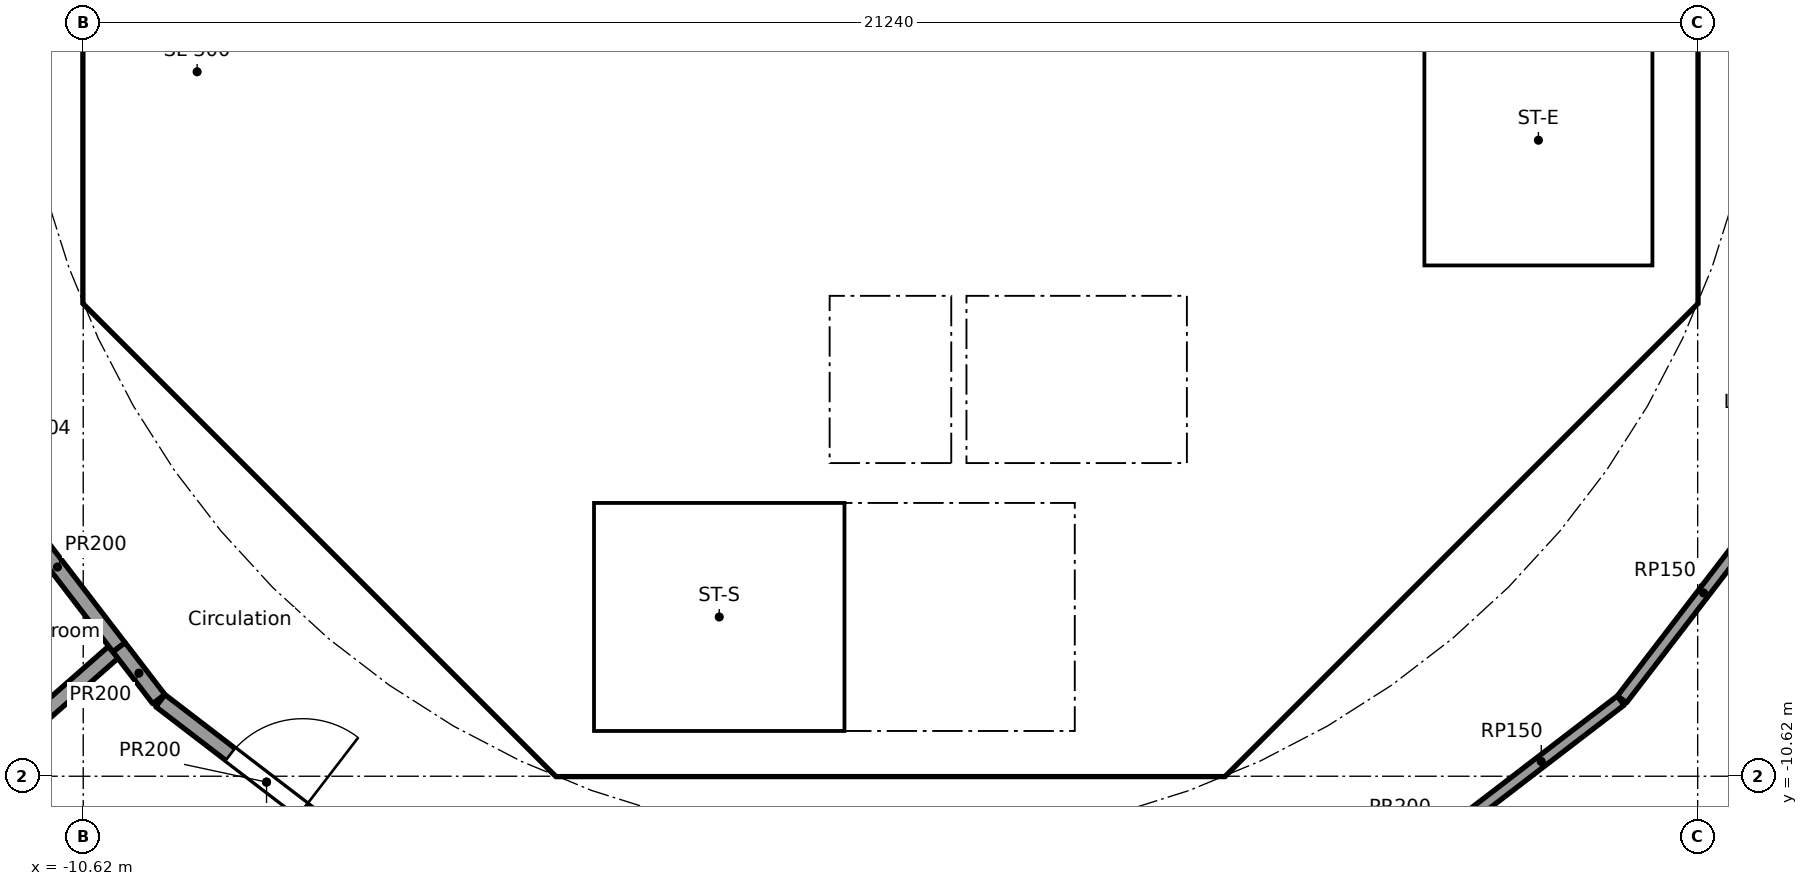
"""IFC4 building model, lengths in metres.
Left out: names, types, materials, properties, quantities, classifications, styles, units other than length and angle.
Written with IfcOpenShell. Run it as: python <this file> out.ifc"""

import sys

from ifc_helpers import new_model, si_unit, direction, frame, frame_2d, origin, place, context, subcontext, project, spatial, polyline, rectangle, outline, extrude, element, fill, save


model = new_model("IFC4")
c1 = context("Model", 3, precision=1e-05, world=origin(), true_north=direction((0.0, 1.0)))
c2 = subcontext(c1, "Body", "Model", "MODEL_VIEW")
j1 = project(units=[si_unit("LENGTHUNIT", "METRE"), si_unit("PLANEANGLEUNIT", "RADIAN")], contexts=[c1])
p1 = place(None, origin())
s1 = spatial("IfcSite", under=j1, at=p1, CompositionType="ELEMENT")
p2 = place(p1, origin())
s2 = spatial("IfcBuilding", under=s1, at=p2, CompositionType="ELEMENT")
p3 = place(p2, frame((0.0, 0.0, 336.9)))
s3 = spatial("IfcBuildingStorey", under=s2, at=p3, CompositionType="ELEMENT", Elevation=336.9)
p4 = place(p3, frame((-10.325, 3.801, 0.0), z_axis=(0.0, 0.0, 1.0), x_axis=(0.0, -1.0, 0.0)))
e1 = element("IfcWall", 1, at=p4, inside=s3, PredefinedType="SHEAR", context=c2, shape_type="SweptSolid", body=[
    extrude(rectangle(XDim=7.602, YDim=0.6, at=frame_2d((3.801, 0.0))), origin(), (0.0, 0.0, 1.0), 3.7),
])
p5 = place(p4, frame((0.651, 0.0, 0.0)))
e2 = element("IfcOpeningElement", 2, at=p5, cuts=e1, PredefinedType="OPENING", context=c2, shape_type="SweptSolid", body=[
    extrude(rectangle(XDim=1.5, YDim=2.1, at=frame_2d((0.75, 1.05))), frame((0.0, 0.31, 0.0), z_axis=(0.0, -1.0, 0.0), x_axis=(1.0, 0.0, 0.0)), (0.0, 0.0, 1.0), 0.62),
])
p6 = place(p4, frame((5.451, 0.0, 0.0)))
e3 = element("IfcOpeningElement", 3, at=p6, cuts=e1, PredefinedType="OPENING", context=c2, shape_type="SweptSolid", body=[
    extrude(rectangle(XDim=1.5, YDim=2.1, at=frame_2d((0.75, 1.05))), frame((0.0, 0.31, 0.0), z_axis=(0.0, -1.0, 0.0), x_axis=(1.0, 0.0, 0.0)), (0.0, 0.0, 1.0), 0.62),
])
p7 = place(p3, frame((-9.988, -4.613, 0.0), z_axis=(0.0, 0.0, 1.0), x_axis=(0.707106781187, -0.707106781187, 0.0)))
e4 = element("IfcWall", 4, at=p7, inside=s3, PredefinedType="SHEAR", context=c2, shape_type="SweptSolid", body=[
    extrude(rectangle(XDim=7.602, YDim=0.6, at=frame_2d((3.801, 0.0))), origin(), (0.0, 0.0, 1.0), 3.7),
])
p8 = place(p7, frame((6.151, 0.0, 0.0)))
e5 = element("IfcOpeningElement", 5, at=p8, cuts=e4, PredefinedType="OPENING", context=c2, shape_type="SweptSolid", body=[
    extrude(rectangle(XDim=1.1, YDim=2.1, at=frame_2d((0.55, 1.05))), frame((0.0, 0.31, 0.0), z_axis=(0.0, -1.0, 0.0), x_axis=(1.0, 0.0, 0.0)), (0.0, 0.0, 1.0), 0.62),
])
p9 = place(p3, frame((4.613, -9.988, 0.0), z_axis=(0.0, 0.0, 1.0), x_axis=(0.707106781187, 0.707106781187, 0.0)))
e6 = element("IfcWall", 6, at=p9, inside=s3, PredefinedType="SHEAR", context=c2, shape_type="SweptSolid", body=[
    extrude(rectangle(XDim=7.602, YDim=0.6, at=frame_2d((3.801, 0.0))), origin(), (0.0, 0.0, 1.0), 3.7),
])
p10 = place(p9, frame((3.201, 0.0, 0.0)))
e7 = element("IfcOpeningElement", 7, at=p10, cuts=e6, PredefinedType="OPENING", context=c2, shape_type="SweptSolid", body=[
    extrude(rectangle(XDim=1.2, YDim=2.1, at=frame_2d((0.6, 1.05))), frame((0.0, 0.31, 0.0), z_axis=(0.0, -1.0, 0.0), x_axis=(1.0, 0.0, 0.0)), (0.0, 0.0, 1.0), 0.62),
])
p11 = place(p3, frame((4.0, -10.025, 0.0), z_axis=(0.0, 0.0, 1.0), x_axis=(0.0, 1.0, 0.0)))
e8 = element("IfcWall", 8, at=p11, inside=s3, PredefinedType="SOLIDWALL", context=c2, shape_type="SweptSolid", body=[
    extrude(rectangle(XDim=3.0, YDim=0.2, at=frame_2d((1.5, 0.0))), origin(), (0.0, 0.0, 1.0), 3.7),
])
p12 = place(p11, frame((0.975, 0.0, 0.0)))
e9 = element("IfcOpeningElement", 9, at=p12, cuts=e8, PredefinedType="OPENING", context=c2, shape_type="SweptSolid", body=[
    extrude(rectangle(XDim=1.1, YDim=2.1, at=frame_2d((0.55, 1.05))), frame((0.0, 0.11, 0.0), z_axis=(0.0, -1.0, 0.0), x_axis=(1.0, 0.0, 0.0)), (0.0, 0.0, 1.0), 0.22),
])
p13 = place(p3, frame((-7.0, -7.027, 0.0), z_axis=(0.0, 0.0, 1.0), x_axis=(0.0, 1.0, 0.0)))
e10 = element("IfcWall", 10, at=p13, inside=s3, PredefinedType="PARTITIONING", context=c2, shape_type="SweptSolid", body=[
    extrude(rectangle(XDim=2.927, YDim=0.15, at=frame_2d((1.463, 0.0))), origin(), (0.0, 0.0, 1.0), 3.7),
])
p14 = place(p13, frame((0.976, 0.0, 0.0)))
e11 = element("IfcOpeningElement", 11, at=p14, cuts=e10, PredefinedType="OPENING", context=c2, shape_type="SweptSolid", body=[
    extrude(rectangle(XDim=0.9, YDim=2.1, at=frame_2d((0.45, 1.05))), frame((0.0, 0.085, 0.0), z_axis=(0.0, -1.0, 0.0), x_axis=(1.0, 0.0, 0.0)), (0.0, 0.0, 1.0), 0.17),
])
p15 = place(p3, frame((4.0, -6.5, 0.0), z_axis=(0.0, 0.0, 1.0), x_axis=(0.0, 1.0, 0.0)))
e12 = element("IfcWall", 12, at=p15, inside=s3, PredefinedType="SOLIDWALL", context=c2, shape_type="SweptSolid", body=[
    extrude(rectangle(XDim=2.2, YDim=0.2, at=frame_2d((1.1, 0.0))), origin(), (0.0, 0.0, 1.0), 3.7),
])
p16 = place(p15, frame((0.55, 0.0, 0.0)))
e13 = element("IfcOpeningElement", 13, at=p16, cuts=e12, PredefinedType="OPENING", context=c2, shape_type="SweptSolid", body=[
    extrude(rectangle(XDim=1.1, YDim=2.1, at=frame_2d((0.55, 1.05))), frame((0.0, 0.11, 0.0), z_axis=(0.0, -1.0, 0.0), x_axis=(1.0, 0.0, 0.0)), (0.0, 0.0, 1.0), 0.22),
])
p17 = place(p3, frame((-4.0, -6.5, 0.0), z_axis=(0.0, 0.0, 1.0), x_axis=(0.0, 1.0, 0.0)))
e14 = element("IfcWall", 14, at=p17, inside=s3, PredefinedType="SOLIDWALL", context=c2, shape_type="SweptSolid", body=[
    extrude(rectangle(XDim=2.2, YDim=0.2, at=frame_2d((1.1, 0.0))), origin(), (0.0, 0.0, 1.0), 3.7),
])
p18 = place(p17, frame((0.65, 0.0, 0.0)))
e15 = element("IfcOpeningElement", 15, at=p18, cuts=e14, PredefinedType="OPENING", context=c2, shape_type="SweptSolid", body=[
    extrude(rectangle(XDim=0.9, YDim=2.1, at=frame_2d((0.45, 1.05))), frame((0.0, 0.11, 0.0), z_axis=(0.0, -1.0, 0.0), x_axis=(1.0, 0.0, 0.0)), (0.0, 0.0, 1.0), 0.22),
])
p19 = place(p3, frame((-6.7, -2.0, 0.0), z_axis=(0.0, 0.0, 1.0), x_axis=(1.0, 0.0, 0.0)))
e16 = element("IfcWall", 16, at=p19, inside=s3, PredefinedType="SOLIDWALL", context=c2, shape_type="SweptSolid", body=[
    extrude(rectangle(XDim=13.4, YDim=0.2, at=frame_2d((6.7, 0.0))), origin(), (0.0, 0.0, 1.0), 3.7),
])
p20 = place(p19, frame((1.85, 0.0, 0.0)))
e17 = element("IfcOpeningElement", 17, at=p20, cuts=e16, PredefinedType="OPENING", context=c2, shape_type="SweptSolid", body=[
    extrude(rectangle(XDim=0.9, YDim=2.1, at=frame_2d((0.45, 1.05))), frame((0.0, 0.11, 0.0), z_axis=(0.0, -1.0, 0.0), x_axis=(1.0, 0.0, 0.0)), (0.0, 0.0, 1.0), 0.22),
])
p21 = place(p19, frame((6.25, 0.0, 0.0)))
e18 = element("IfcOpeningElement", 18, at=p21, cuts=e16, PredefinedType="OPENING", context=c2, shape_type="SweptSolid", body=[
    extrude(rectangle(XDim=0.9, YDim=2.1, at=frame_2d((0.45, 1.05))), frame((0.0, 0.11, 0.0), z_axis=(0.0, -1.0, 0.0), x_axis=(1.0, 0.0, 0.0)), (0.0, 0.0, 1.0), 0.22),
])
p22 = place(p19, frame((10.65, 0.0, 0.0)))
e19 = element("IfcOpeningElement", 19, at=p22, cuts=e16, PredefinedType="OPENING", context=c2, shape_type="SweptSolid", body=[
    extrude(rectangle(XDim=0.9, YDim=2.1, at=frame_2d((0.45, 1.05))), frame((0.0, 0.11, 0.0), z_axis=(0.0, -1.0, 0.0), x_axis=(1.0, 0.0, 0.0)), (0.0, 0.0, 1.0), 0.22),
])
p23 = place(p3, origin())
e20 = element("IfcWall", 20, at=p23, inside=s3, PredefinedType="SHEAR", context=c2, shape_type="SweptSolid", body=[
    extrude(outline(polyline([(-10.625, -3.801), (-10.025, -3.801), (-10.025, -4.152), (-9.776, -4.401), (-10.2, -4.825), (-10.625, -4.401), (-10.625, -3.801)])), origin(), (0.0, 0.0, 1.0), 3.7),
])
p24 = place(p3, origin())
e21 = element("IfcWall", 21, at=p24, inside=s3, PredefinedType="SHEAR", context=c2, shape_type="SweptSolid", body=[
    extrude(outline(polyline([(-4.152, -10.025), (4.152, -10.025), (4.401, -9.776), (4.825, -10.2), (4.401, -10.625), (-4.401, -10.625), (-4.825, -10.2), (-4.401, -9.776), (-4.152, -10.025)])), origin(), (0.0, 0.0, 1.0), 3.7),
])
p25 = place(p3, origin())
e22 = element("IfcWall", 22, at=p25, inside=s3, PredefinedType="SHEAR", context=c2, shape_type="SweptSolid", body=[
    extrude(outline(polyline([(9.776, -4.401), (10.025, -4.152), (10.025, -3.801), (10.025, 4.152), (9.776, 4.401), (10.2, 4.825), (10.625, 4.401), (10.625, -4.401), (10.2, -4.825), (9.776, -4.401)])), origin(), (0.0, 0.0, 1.0), 3.7),
])
for number, where, z_axis, x_axis in (
    (23, (-0.9, -6.5, 0.0), (0.0, 0.0, 1.0), (0.0, 1.0, 0.0)),
    (24, (0.9, -6.5, 0.0), (0.0, 0.0, 1.0), (0.0, 1.0, 0.0)),
):
    element("IfcWall", number, at=place(p3, frame(where, z_axis=z_axis, x_axis=x_axis)), inside=s3, PredefinedType="SOLIDWALL", context=c2, shape_type="SweptSolid", body=[
        extrude(rectangle(XDim=2.2, YDim=0.2, at=frame_2d((1.1, 0.0))), origin(), (0.0, 0.0, 1.0), 3.7),
    ])
p26 = place(p3, origin())
e25 = element("IfcWall", 25, at=p26, inside=s3, PredefinedType="SOLIDWALL", context=c2, shape_type="SweptSolid", body=[
    extrude(outline(polyline([(-6.7, -2.1), (-6.5, -2.1), (-6.5, -4.1), (-2.3, -4.1), (-2.3, -2.1), (-2.1, -2.1), (-2.1, -4.1), (2.1, -4.1), (2.1, -2.1), (2.3, -2.1), (2.3, -4.1), (6.5, -4.1), (6.5, -2.1), (6.7, -2.1), (6.7, -4.3), (-6.7, -4.3), (-6.7, -2.1)])), origin(), (0.0, 0.0, 1.0), 3.7),
])
p27 = place(p3, frame((-10.025, -4.0, 0.0), z_axis=(0.0, 0.0, 1.0), x_axis=(1.0, 0.0, 0.0)))
e26 = element("IfcWall", 26, at=p27, inside=s3, PredefinedType="PARTITIONING", context=c2, shape_type="SweptSolid", body=[
    extrude(rectangle(XDim=3.325, YDim=0.2, at=frame_2d((1.662, 0.0))), origin(), (0.0, 0.0, 1.0), 3.7),
])
p28 = place(p3, origin())
e27 = element("IfcWall", 27, at=p28, inside=s3, PredefinedType="SOLIDWALL", context=c2, shape_type="SweptSolid", body=[
    extrude(outline(polyline([(-3.9, -10.025), (-4.1, -10.025), (-4.1, -7.025), (-3.9, -7.025), (-3.9, -10.025)])), origin(), (0.0, 0.0, 1.0), 3.7),
])
p29 = place(p3, origin())
e28 = element("IfcWall", 28, at=p29, inside=s3, PredefinedType="SOLIDWALL", context=c2, shape_type="SweptSolid", body=[
    extrude(outline(polyline([(4.1, -7.025), (-4.1, -7.025), (-4.1, -6.5), (4.1, -6.5), (4.1, -7.025)])), origin(), (0.0, 0.0, 1.0), 3.7),
])
p30 = place(p3, origin())
e29 = element("IfcWall", 29, at=p30, inside=s3, PredefinedType="SOLIDWALL", context=c2, shape_type="SweptSolid", body=[
    extrude(outline(polyline([(7.025, -3.9), (6.7, -3.9), (6.7, 3.9), (7.025, 3.9), (7.025, -3.9)])), origin(), (0.0, 0.0, 1.0), 3.7),
])
p31 = place(p3, origin())
e30 = element("IfcWall", 30, at=p31, inside=s3, PredefinedType="SOLIDWALL", context=c2, shape_type="SweptSolid", body=[
    extrude(outline(polyline([(10.025, -4.1), (6.7, -4.1), (6.7, -3.9), (10.025, -3.9), (10.025, -4.1)])), origin(), (0.0, 0.0, 1.0), 3.7),
])
p32 = place(p3, frame((9.607, -9.624, 0.0), z_axis=(0.0, 0.0, 1.0), x_axis=(-0.793381127635, -0.608725214126, 0.0)))
e31 = element("IfcWall", 31, at=p32, inside=s3, PredefinedType="PARTITIONING", context=c2, shape_type="SweptSolid", body=[
    extrude(rectangle(XDim=2.635, YDim=0.15, at=frame_2d((1.317, 0.0))), origin(), (0.0, 0.0, 1.0), 3.7),
])
p33 = place(p3, frame((11.771, -6.809, 0.0), z_axis=(0.0, 0.0, 1.0), x_axis=(-0.608736710054, -0.793372307201, 0.0)))
e32 = element("IfcWall", 32, at=p33, inside=s3, PredefinedType="PARTITIONING", context=c2, shape_type="SweptSolid", body=[
    extrude(rectangle(XDim=3.527, YDim=0.15, at=frame_2d((1.763, 0.0))), origin(), (0.0, 0.0, 1.0), 3.7),
])
p34 = place(p3, frame((-10.224, -8.989, 0.0), z_axis=(0.0, 0.0, 1.0), x_axis=(-0.750994766266, -0.660308156122, 0.0)))
e33 = element("IfcWall", 33, at=p34, inside=s3, PredefinedType="PARTITIONING", context=c2, shape_type="SweptSolid", body=[
    extrude(rectangle(XDim=4.097, YDim=0.2, at=frame_2d((2.049, 0.0))), origin(), (0.0, 0.0, 1.0), 3.7),
])
p35 = place(p3, frame((-10.149, -8.923, 0.0), z_axis=(0.0, 0.0, 1.0), x_axis=(-0.608699260048, 0.793401040343, 0.0)))
e34 = element("IfcWall", 34, at=p35, inside=s3, PredefinedType="PARTITIONING", context=c2, shape_type="SweptSolid", body=[
    extrude(rectangle(XDim=2.661, YDim=0.2, at=frame_2d((1.331, 0.0))), origin(), (0.0, 0.0, 1.0), 3.7),
])
p36 = place(p3, frame((-9.626, -9.605, 0.0), z_axis=(0.0, 0.0, 1.0), x_axis=(-0.608694005511, 0.793405071609, 0.0)))
e35 = element("IfcWall", 35, at=p36, inside=s3, PredefinedType="PARTITIONING", context=c2, shape_type="SweptSolid", body=[
    extrude(rectangle(XDim=0.859, YDim=0.2, at=frame_2d((0.43, 0.0))), origin(), (0.0, 0.0, 1.0), 3.7),
])
p37 = place(p3, frame((-6.812, -11.769, 0.0), z_axis=(0.0, 0.0, 1.0), x_axis=(-0.793402024283, 0.608697977542, 0.0)))
e36 = element("IfcWall", 36, at=p37, inside=s3, PredefinedType="PARTITIONING", context=c2, shape_type="SweptSolid", body=[
    extrude(rectangle(XDim=3.52, YDim=0.2, at=frame_2d((1.76, 0.0))), origin(), (0.0, 0.0, 1.0), 3.7),
])
p38 = place(p37, frame((1.16, 0.0, 0.0)))
e37 = element("IfcOpeningElement", 37, at=p38, cuts=e36, PredefinedType="OPENING", context=c2, shape_type="SweptSolid", body=[
    extrude(rectangle(XDim=1.2, YDim=2.1, at=frame_2d((0.6, 1.05))), frame((0.0, 0.11, 0.0), z_axis=(0.0, -1.0, 0.0), x_axis=(1.0, 0.0, 0.0)), (0.0, 0.0, 1.0), 0.22),
])
p39 = place(p16, origin())
e38 = element("IfcDoor", 38, at=p39, inside=s3, OperationType="DOUBLE_DOOR_SLIDING", PredefinedType="DOOR", context=c2, shape_type="SweptSolid", body=[
    extrude(rectangle(XDim=1.1, YDim=2.1, at=frame_2d((0.55, 1.05))), frame((0.0, 0.025, 0.0), z_axis=(0.0, -1.0, 0.0), x_axis=(1.0, 0.0, 0.0)), (0.0, 0.0, 1.0), 0.05),
])
fill(e13, e38)
p40 = place(p12, origin())
e39 = element("IfcDoor", 39, at=p40, inside=s3, OperationType="SINGLE_SWING_LEFT", PredefinedType="DOOR", context=c2, shape_type="SweptSolid", body=[
    extrude(rectangle(XDim=1.1, YDim=2.1, at=frame_2d((0.55, 1.05))), frame((0.0, 0.025, 0.0), z_axis=(0.0, -1.0, 0.0), x_axis=(1.0, 0.0, 0.0)), (0.0, 0.0, 1.0), 0.05),
])
fill(e9, e39)
p41 = place(p14, origin())
e40 = element("IfcDoor", 40, at=p41, inside=s3, OperationType="SINGLE_SWING_LEFT", PredefinedType="DOOR", context=c2, shape_type="SweptSolid", body=[
    extrude(rectangle(XDim=0.9, YDim=2.1, at=frame_2d((0.45, 1.05))), frame((0.0, 0.025, 0.0), z_axis=(0.0, -1.0, 0.0), x_axis=(1.0, 0.0, 0.0)), (0.0, 0.0, 1.0), 0.05),
])
fill(e11, e40)
p42 = place(p18, frame((0.9, 0.0, 0.0), x_axis=(-1.0, 0.0, 0.0)))
e41 = element("IfcDoor", 41, at=p42, inside=s3, OperationType="SINGLE_SWING_LEFT", PredefinedType="DOOR", context=c2, shape_type="SweptSolid", body=[
    extrude(rectangle(XDim=0.9, YDim=2.1, at=frame_2d((0.45, 1.05))), frame((0.0, 0.025, 0.0), z_axis=(0.0, -1.0, 0.0), x_axis=(1.0, 0.0, 0.0)), (0.0, 0.0, 1.0), 0.05),
])
fill(e15, e41)
p43 = place(p20, frame((0.9, 0.0, 0.0), x_axis=(-1.0, 0.0, 0.0)))
e42 = element("IfcDoor", 42, at=p43, inside=s3, OperationType="SINGLE_SWING_LEFT", PredefinedType="DOOR", context=c2, shape_type="SweptSolid", body=[
    extrude(rectangle(XDim=0.9, YDim=2.1, at=frame_2d((0.45, 1.05))), frame((0.0, 0.025, 0.0), z_axis=(0.0, -1.0, 0.0), x_axis=(1.0, 0.0, 0.0)), (0.0, 0.0, 1.0), 0.05),
])
fill(e17, e42)
p44 = place(p21, frame((0.9, 0.0, 0.0), x_axis=(-1.0, 0.0, 0.0)))
e43 = element("IfcDoor", 43, at=p44, inside=s3, OperationType="SINGLE_SWING_LEFT", PredefinedType="DOOR", context=c2, shape_type="SweptSolid", body=[
    extrude(rectangle(XDim=0.9, YDim=2.1, at=frame_2d((0.45, 1.05))), frame((0.0, 0.025, 0.0), z_axis=(0.0, -1.0, 0.0), x_axis=(1.0, 0.0, 0.0)), (0.0, 0.0, 1.0), 0.05),
])
fill(e18, e43)
p45 = place(p22, frame((0.9, 0.0, 0.0), x_axis=(-1.0, 0.0, 0.0)))
e44 = element("IfcDoor", 44, at=p45, inside=s3, OperationType="SINGLE_SWING_RIGHT", PredefinedType="DOOR", context=c2, shape_type="SweptSolid", body=[
    extrude(rectangle(XDim=0.9, YDim=2.1, at=frame_2d((0.45, 1.05))), frame((0.0, 0.025, 0.0), z_axis=(0.0, -1.0, 0.0), x_axis=(1.0, 0.0, 0.0)), (0.0, 0.0, 1.0), 0.05),
])
fill(e19, e44)
p46 = place(p10, origin())
e45 = element("IfcDoor", 45, at=p46, inside=s3, OperationType="SINGLE_SWING_RIGHT", PredefinedType="DOOR", context=c2, shape_type="SweptSolid", body=[
    extrude(rectangle(XDim=1.2, YDim=2.1, at=frame_2d((0.6, 1.05))), frame((0.0, 0.025, 0.0), z_axis=(0.0, -1.0, 0.0), x_axis=(1.0, 0.0, 0.0)), (0.0, 0.0, 1.0), 0.05),
])
fill(e7, e45)
p47 = place(p6, origin())
e46 = element("IfcDoor", 46, at=p47, inside=s3, OperationType="DOUBLE_DOOR_SINGLE_SWING", PredefinedType="DOOR", context=c2, shape_type="SweptSolid", body=[
    extrude(rectangle(XDim=1.5, YDim=2.1, at=frame_2d((0.75, 1.05))), frame((0.0, 0.025, 0.0), z_axis=(0.0, -1.0, 0.0), x_axis=(1.0, 0.0, 0.0)), (0.0, 0.0, 1.0), 0.05),
])
fill(e3, e46)
p48 = place(p8, origin())
e47 = element("IfcDoor", 47, at=p48, inside=s3, OperationType="SINGLE_SWING_RIGHT", PredefinedType="DOOR", context=c2, shape_type="SweptSolid", body=[
    extrude(rectangle(XDim=1.1, YDim=2.1, at=frame_2d((0.55, 1.05))), frame((0.0, 0.025, 0.0), z_axis=(0.0, -1.0, 0.0), x_axis=(1.0, 0.0, 0.0)), (0.0, 0.0, 1.0), 0.05),
])
fill(e5, e47)
p49 = place(p38, frame((1.2, 0.0, 0.0), x_axis=(-1.0, 0.0, 0.0)))
e48 = element("IfcDoor", 48, at=p49, inside=s3, OperationType="SINGLE_SWING_RIGHT", PredefinedType="DOOR", context=c2, shape_type="SweptSolid", body=[
    extrude(rectangle(XDim=1.2, YDim=2.1, at=frame_2d((0.6, 1.05))), frame((0.0, 0.025, 0.0), z_axis=(0.0, -1.0, 0.0), x_axis=(1.0, 0.0, 0.0)), (0.0, 0.0, 1.0), 0.05),
])
fill(e37, e48)
save(model, sys.argv[1])
